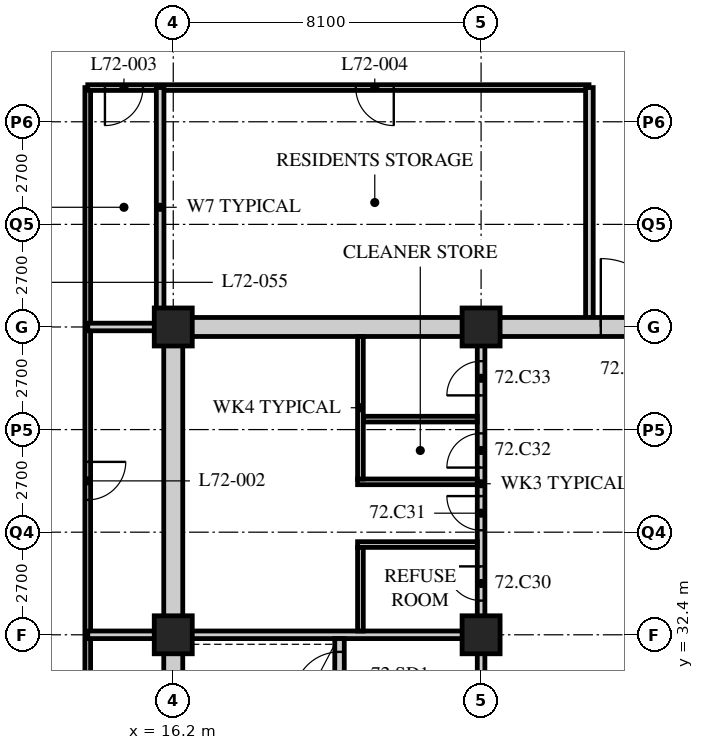
"""IFC4 building model, lengths in metres.
Left out: names, types, materials, properties, quantities, classifications, styles, units other than length and angle.
Written with IfcOpenShell. Run it as: python <this file> out.ifc"""

import sys

from ifc_helpers import new_model, si_unit, direction, frame, frame_2d, origin, origin_2d, place, context, subcontext, project, spatial, rectangle, hollow_rectangle, extrude, element, fill, save


model = new_model("IFC4")
c1 = context("Model", 3, precision=1e-05, world=origin(), true_north=direction((0.0, 1.0)))
c2 = subcontext(c1, "Body", "Model", "MODEL_VIEW")
j1 = project(units=[si_unit("LENGTHUNIT", "METRE"), si_unit("PLANEANGLEUNIT", "RADIAN")], contexts=[c1])
p1 = place(None, origin())
s1 = spatial("IfcSite", under=j1, at=p1, CompositionType="ELEMENT")
p2 = place(p1, origin())
s2 = spatial("IfcBuilding", under=s1, at=p2, CompositionType="ELEMENT")
p3 = place(p2, frame((0.0, 0.0, 281.4)))
s3 = spatial("IfcBuildingStorey", under=s2, at=p3, CompositionType="ELEMENT", Elevation=281.4)
for number, where, z_axis, x_axis in (
    (1, (16.2, 32.4, 0.0), (0.0, 0.0, 1.0), (1.0, 0.0, 0.0)),
    (2, (16.2, 40.5, 0.0), (0.0, 0.0, 1.0), (1.0, 0.0, 0.0)),
    (3, (24.3, 32.4, 0.0), (0.0, 0.0, 1.0), (1.0, 0.0, 0.0)),
    (4, (24.3, 40.5, 0.0), (0.0, 0.0, 1.0), (1.0, 0.0, 0.0)),
):
    element("IfcColumn", number, at=place(p3, frame(where, z_axis=z_axis, x_axis=x_axis)), inside=s3, PredefinedType="COLUMN", context=c2, shape_type="SweptSolid", body=[
        extrude(hollow_rectangle(XDim=1.0, YDim=1.0, WallThickness=0.1, at=origin_2d()), origin(), (0.0, 0.0, 1.0), 3.9),
    ])
p4 = place(p3, frame((13.95, 24.3, 0.0), z_axis=(0.0, 0.0, 1.0), x_axis=(0.0, 1.0, 0.0)))
e5 = element("IfcWall", 5, at=p4, inside=s3, PredefinedType="PARTITIONING", context=c2, shape_type="SweptSolid", body=[
    extrude(rectangle(XDim=22.5, YDim=0.15, at=frame_2d((11.25, 0.0))), origin(), (0.0, 0.0, 1.0), 3.69),
])
p5 = place(p4, frame((3.55, 0.0, 0.0)))
e6 = element("IfcOpeningElement", 6, at=p5, cuts=e5, PredefinedType="OPENING", context=c2, shape_type="SweptSolid", body=[
    extrude(rectangle(XDim=1.0, YDim=2.1, at=frame_2d((0.5, 1.05))), frame((0.0, 0.085, 0.0), z_axis=(0.0, -1.0, 0.0), x_axis=(1.0, 0.0, 0.0)), (0.0, 0.0, 1.0), 0.17),
])
p6 = place(p4, frame((11.65, 0.0, 0.0)))
e7 = element("IfcOpeningElement", 7, at=p6, cuts=e5, PredefinedType="OPENING", context=c2, shape_type="SweptSolid", body=[
    extrude(rectangle(XDim=1.0, YDim=2.1, at=frame_2d((0.5, 1.05))), frame((0.0, 0.085, 0.0), z_axis=(0.0, -1.0, 0.0), x_axis=(1.0, 0.0, 0.0)), (0.0, 0.0, 1.0), 0.17),
])
p7 = place(p3, frame((13.95, 46.8, 0.0), z_axis=(0.0, 0.0, 1.0), x_axis=(1.0, 0.0, 0.0)))
e8 = element("IfcWall", 8, at=p7, inside=s3, PredefinedType="PARTITIONING", context=c2, shape_type="SweptSolid", body=[
    extrude(rectangle(XDim=13.19, YDim=0.15, at=frame_2d((6.595, 0.0))), origin(), (0.0, 0.0, 1.0), 3.69),
])
p8 = place(p7, frame((0.452, 0.0, 0.0)))
e9 = element("IfcOpeningElement", 9, at=p8, cuts=e8, PredefinedType="OPENING", context=c2, shape_type="SweptSolid", body=[
    extrude(rectangle(XDim=1.0, YDim=2.1, at=frame_2d((0.5, 1.05))), frame((0.0, 0.085, 0.0), z_axis=(0.0, -1.0, 0.0), x_axis=(1.0, 0.0, 0.0)), (0.0, 0.0, 1.0), 0.17),
])
p9 = place(p7, frame((7.052, 0.0, 0.0)))
e10 = element("IfcOpeningElement", 10, at=p9, cuts=e8, PredefinedType="OPENING", context=c2, shape_type="SweptSolid", body=[
    extrude(rectangle(XDim=1.0, YDim=2.1, at=frame_2d((0.5, 1.05))), frame((0.0, 0.085, 0.0), z_axis=(0.0, -1.0, 0.0), x_axis=(1.0, 0.0, 0.0)), (0.0, 0.0, 1.0), 0.17),
])
p10 = place(p3, frame((13.95, 32.4, 0.0), z_axis=(0.0, 0.0, 1.0), x_axis=(1.0, 0.0, 0.0)))
e11 = element("IfcWall", 11, at=p10, inside=s3, PredefinedType="SOLIDWALL", context=c2, shape_type="SweptSolid", body=[
    extrude(rectangle(XDim=2.25, YDim=0.2, at=frame_2d((1.125, 0.0))), origin(), (0.0, 0.0, 1.0), 3.078),
])
for number, where, z_axis, x_axis in (
    (12, (15.855, 46.8, 0.0), (0.0, 0.0, 1.0), (0.0, -1.0, 0.0)),
    (13, (27.15, 40.5, 0.0), (0.0, 0.0, 1.0), (0.0, 1.0, 0.0)),
):
    element("IfcWall", number, at=place(p3, frame(where, z_axis=z_axis, x_axis=x_axis)), inside=s3, PredefinedType="SOLIDWALL", context=c2, shape_type="SweptSolid", body=[
        extrude(rectangle(XDim=6.3, YDim=0.2, at=frame_2d((3.15, 0.0))), origin(), (0.0, 0.0, 1.0), 3.69),
    ])
p11 = place(p3, frame((13.95, 40.5, 0.0), z_axis=(0.0, 0.0, 1.0), x_axis=(1.0, 0.0, 0.0)))
e14 = element("IfcWall", 14, at=p11, inside=s3, PredefinedType="SOLIDWALL", context=c2, shape_type="SweptSolid", body=[
    extrude(rectangle(XDim=2.25, YDim=0.2, at=frame_2d((1.125, 0.0))), origin(), (0.0, 0.0, 1.0), 3.078),
])
p12 = place(p3, frame((15.95, 40.5, 0.0), z_axis=(0.0, 0.0, 1.0), x_axis=(1.0, 0.0, 0.0)))
e15 = element("IfcWall", 15, at=p12, inside=s3, PredefinedType="SOLIDWALL", context=c2, shape_type="SweptSolid", body=[
    extrude(rectangle(XDim=24.55, YDim=0.5, at=frame_2d((12.275, 0.0))), origin(), (0.0, 0.0, 1.0), 3.04),
])
p13 = place(p12, frame((11.5, 0.0, 0.0)))
e16 = element("IfcOpeningElement", 16, at=p13, cuts=e15, PredefinedType="OPENING", context=c2, shape_type="SweptSolid", body=[
    extrude(rectangle(XDim=1.8, YDim=2.4, at=frame_2d((0.9, 1.2))), frame((0.0, 0.26, 0.0), z_axis=(0.0, -1.0, 0.0), x_axis=(1.0, 0.0, 0.0)), (0.0, 0.0, 1.0), 0.52),
])
p14 = place(p3, frame((16.2, 24.55, 0.0), z_axis=(0.0, 0.0, 1.0), x_axis=(0.0, 1.0, 0.0)))
e17 = element("IfcWall", 17, at=p14, inside=s3, PredefinedType="SOLIDWALL", context=c2, shape_type="SweptSolid", body=[
    extrude(rectangle(XDim=15.7, YDim=0.5, at=frame_2d((7.85, 0.0))), origin(), (0.0, 0.0, 1.0), 3.078),
])
p15 = place(p3, frame((16.45, 32.4, 0.0), z_axis=(0.0, 0.0, 1.0), x_axis=(1.0, 0.0, 0.0)))
e18 = element("IfcWall", 18, at=p15, inside=s3, PredefinedType="SOLIDWALL", context=c2, shape_type="SweptSolid", body=[
    extrude(rectangle(XDim=7.95, YDim=0.2, at=frame_2d((3.975, 0.0))), origin(), (0.0, 0.0, 1.0), 3.078),
])
p16 = place(p3, frame((24.3, 24.55, 0.0), z_axis=(0.0, 0.0, 1.0), x_axis=(0.0, 1.0, 0.0)))
e19 = element("IfcWall", 19, at=p16, inside=s3, PredefinedType="SOLIDWALL", context=c2, shape_type="SweptSolid", body=[
    extrude(rectangle(XDim=7.75, YDim=0.2, at=frame_2d((3.875, 0.0))), origin(), (0.0, 0.0, 1.0), 3.078),
])
p17 = place(p16, frame((4.6, 0.0, 0.0)))
e20 = element("IfcOpeningElement", 20, at=p17, cuts=e19, PredefinedType="OPENING", context=c2, shape_type="SweptSolid", body=[
    extrude(rectangle(XDim=1.2, YDim=2.1, at=frame_2d((0.6, 1.05))), frame((0.0, 0.11, 0.0), z_axis=(0.0, -1.0, 0.0), x_axis=(1.0, 0.0, 0.0)), (0.0, 0.0, 1.0), 0.22),
])
p18 = place(p3, frame((20.575, 24.55, 0.0), z_axis=(0.0, 0.0, 1.0), x_axis=(0.0, 1.0, 0.0)))
e21 = element("IfcWall", 21, at=p18, inside=s3, PredefinedType="SOLIDWALL", context=c2, shape_type="SweptSolid", body=[
    extrude(rectangle(XDim=7.75, YDim=0.25, at=frame_2d((3.875, 0.0))), origin(), (0.0, 0.0, 1.0), 3.69),
])
p19 = place(p18, frame((6.2, 0.0, 0.0)))
e22 = element("IfcOpeningElement", 22, at=p19, cuts=e21, PredefinedType="OPENING", context=c2, shape_type="SweptSolid", body=[
    extrude(rectangle(XDim=1.2, YDim=2.1, at=frame_2d((0.6, 1.05))), frame((0.0, 0.135, 0.0), z_axis=(0.0, -1.0, 0.0), x_axis=(1.0, 0.0, 0.0)), (0.0, 0.0, 1.0), 0.27),
])
p20 = place(p3, frame((24.3, 32.5, 0.0), z_axis=(0.0, 0.0, 1.0), x_axis=(0.0, 1.0, 0.0)))
e23 = element("IfcWall", 23, at=p20, inside=s3, PredefinedType="PARTITIONING", context=c2, shape_type="SweptSolid", body=[
    extrude(rectangle(XDim=7.75, YDim=0.2, at=frame_2d((3.875, 0.0))), origin(), (0.0, 0.0, 1.0), 3.078),
])
p21 = place(p20, frame((0.8, 0.0, 0.0)))
e24 = element("IfcOpeningElement", 24, at=p21, cuts=e23, PredefinedType="OPENING", context=c2, shape_type="SweptSolid", body=[
    extrude(rectangle(XDim=0.9, YDim=2.1, at=frame_2d((0.45, 1.05))), frame((0.0, 0.11, 0.0), z_axis=(0.0, -1.0, 0.0), x_axis=(1.0, 0.0, 0.0)), (0.0, 0.0, 1.0), 0.22),
])
p22 = place(p20, frame((2.65, 0.0, 0.0)))
e25 = element("IfcOpeningElement", 25, at=p22, cuts=e23, PredefinedType="OPENING", context=c2, shape_type="SweptSolid", body=[
    extrude(rectangle(XDim=0.9, YDim=2.1, at=frame_2d((0.45, 1.05))), frame((0.0, 0.11, 0.0), z_axis=(0.0, -1.0, 0.0), x_axis=(1.0, 0.0, 0.0)), (0.0, 0.0, 1.0), 0.22),
])
p23 = place(p20, frame((4.3, 0.0, 0.0)))
e26 = element("IfcOpeningElement", 26, at=p23, cuts=e23, PredefinedType="OPENING", context=c2, shape_type="SweptSolid", body=[
    extrude(rectangle(XDim=0.9, YDim=2.1, at=frame_2d((0.45, 1.05))), frame((0.0, 0.11, 0.0), z_axis=(0.0, -1.0, 0.0), x_axis=(1.0, 0.0, 0.0)), (0.0, 0.0, 1.0), 0.22),
])
p24 = place(p20, frame((6.2, 0.0, 0.0)))
e27 = element("IfcOpeningElement", 27, at=p24, cuts=e23, PredefinedType="OPENING", context=c2, shape_type="SweptSolid", body=[
    extrude(rectangle(XDim=0.9, YDim=2.1, at=frame_2d((0.45, 1.05))), frame((0.0, 0.11, 0.0), z_axis=(0.0, -1.0, 0.0), x_axis=(1.0, 0.0, 0.0)), (0.0, 0.0, 1.0), 0.22),
])
for number, where, z_axis, x_axis in (
    (28, (21.05, 34.775, 0.0), (0.0, 0.0, 1.0), (1.0, 0.0, 0.0)),
    (29, (21.05, 36.425, 0.0), (0.0, 0.0, 1.0), (1.0, 0.0, 0.0)),
):
    element("IfcWall", number, at=place(p3, frame(where, z_axis=z_axis, x_axis=x_axis)), inside=s3, PredefinedType="PARTITIONING", context=c2, shape_type="SweptSolid", body=[
        extrude(rectangle(XDim=3.15, YDim=0.15, at=frame_2d((1.575, 0.0))), origin(), (0.0, 0.0, 1.0), 3.69),
    ])
p25 = place(p3, frame((21.2, 38.075, 0.0), z_axis=(0.0, 0.0, 1.0), x_axis=(1.0, 0.0, 0.0)))
e30 = element("IfcWall", 30, at=p25, inside=s3, PredefinedType="PARTITIONING", context=c2, shape_type="SweptSolid", body=[
    extrude(rectangle(XDim=3.0, YDim=0.15, at=frame_2d((1.5, 0.0))), origin(), (0.0, 0.0, 1.0), 3.69),
])
p26 = place(p3, frame((21.125, 32.5, 0.0), z_axis=(0.0, 0.0, 1.0), x_axis=(0.0, 1.0, 0.0)))
e31 = element("IfcWall", 31, at=p26, inside=s3, PredefinedType="PARTITIONING", context=c2, shape_type="SweptSolid", body=[
    extrude(rectangle(XDim=2.2, YDim=0.15, at=frame_2d((1.1, 0.0))), origin(), (0.0, 0.0, 1.0), 3.69),
])
p27 = place(p3, frame((21.125, 36.5, 0.0), z_axis=(0.0, 0.0, 1.0), x_axis=(0.0, 1.0, 0.0)))
e32 = element("IfcWall", 32, at=p27, inside=s3, PredefinedType="PARTITIONING", context=c2, shape_type="SweptSolid", body=[
    extrude(rectangle(XDim=3.75, YDim=0.15, at=frame_2d((1.875, 0.0))), origin(), (0.0, 0.0, 1.0), 3.69),
])
p28 = place(p6, origin())
e33 = element("IfcDoor", 33, at=p28, inside=s3, OperationType="SINGLE_SWING_LEFT", PredefinedType="DOOR", context=c2, shape_type="SweptSolid", body=[
    extrude(rectangle(XDim=1.0, YDim=2.1, at=frame_2d((0.5, 1.05))), frame((0.0, 0.025, 0.0), z_axis=(0.0, -1.0, 0.0), x_axis=(1.0, 0.0, 0.0)), (0.0, 0.0, 1.0), 0.05),
])
fill(e7, e33)
p29 = place(p8, origin())
e34 = element("IfcDoor", 34, at=p29, inside=s3, OperationType="SINGLE_SWING_RIGHT", PredefinedType="DOOR", context=c2, shape_type="SweptSolid", body=[
    extrude(rectangle(XDim=1.0, YDim=2.1, at=frame_2d((0.5, 1.05))), frame((0.0, 0.025, 0.0), z_axis=(0.0, -1.0, 0.0), x_axis=(1.0, 0.0, 0.0)), (0.0, 0.0, 1.0), 0.05),
])
fill(e9, e34)
p30 = place(p9, origin())
e35 = element("IfcDoor", 35, at=p30, inside=s3, OperationType="SINGLE_SWING_LEFT", PredefinedType="DOOR", context=c2, shape_type="SweptSolid", body=[
    extrude(rectangle(XDim=1.0, YDim=2.1, at=frame_2d((0.5, 1.05))), frame((0.0, 0.025, 0.0), z_axis=(0.0, -1.0, 0.0), x_axis=(1.0, 0.0, 0.0)), (0.0, 0.0, 1.0), 0.05),
])
fill(e10, e35)
p31 = place(p21, origin())
e36 = element("IfcDoor", 36, at=p31, inside=s3, OperationType="SINGLE_SWING_RIGHT", PredefinedType="DOOR", context=c2, shape_type="SweptSolid", body=[
    extrude(rectangle(XDim=0.9, YDim=2.1, at=frame_2d((0.45, 1.05))), frame((0.0, 0.025, 0.0), z_axis=(0.0, -1.0, 0.0), x_axis=(1.0, 0.0, 0.0)), (0.0, 0.0, 1.0), 0.05),
])
fill(e24, e36)
p32 = place(p22, origin())
e37 = element("IfcDoor", 37, at=p32, inside=s3, OperationType="SINGLE_SWING_RIGHT", PredefinedType="DOOR", context=c2, shape_type="SweptSolid", body=[
    extrude(rectangle(XDim=0.9, YDim=2.1, at=frame_2d((0.45, 1.05))), frame((0.0, 0.025, 0.0), z_axis=(0.0, -1.0, 0.0), x_axis=(1.0, 0.0, 0.0)), (0.0, 0.0, 1.0), 0.05),
])
fill(e25, e37)
p33 = place(p23, origin())
e38 = element("IfcDoor", 38, at=p33, inside=s3, OperationType="SINGLE_SWING_LEFT", PredefinedType="DOOR", context=c2, shape_type="SweptSolid", body=[
    extrude(rectangle(XDim=0.9, YDim=2.1, at=frame_2d((0.45, 1.05))), frame((0.0, 0.025, 0.0), z_axis=(0.0, -1.0, 0.0), x_axis=(1.0, 0.0, 0.0)), (0.0, 0.0, 1.0), 0.05),
])
fill(e26, e38)
p34 = place(p24, origin())
e39 = element("IfcDoor", 39, at=p34, inside=s3, OperationType="SINGLE_SWING_LEFT", PredefinedType="DOOR", context=c2, shape_type="SweptSolid", body=[
    extrude(rectangle(XDim=0.9, YDim=2.1, at=frame_2d((0.45, 1.05))), frame((0.0, 0.025, 0.0), z_axis=(0.0, -1.0, 0.0), x_axis=(1.0, 0.0, 0.0)), (0.0, 0.0, 1.0), 0.05),
])
fill(e27, e39)
p35 = place(p19, origin())
e40 = element("IfcDoor", 40, at=p35, inside=s3, OperationType="SINGLE_SWING_LEFT", PredefinedType="DOOR", context=c2, shape_type="SweptSolid", body=[
    extrude(rectangle(XDim=1.2, YDim=2.1, at=frame_2d((0.6, 1.05))), frame((0.0, 0.025, 0.0), z_axis=(0.0, -1.0, 0.0), x_axis=(1.0, 0.0, 0.0)), (0.0, 0.0, 1.0), 0.05),
])
fill(e22, e40)
p36 = place(p13, origin())
e41 = element("IfcDoor", 41, at=p36, inside=s3, OperationType="DOUBLE_DOOR_SINGLE_SWING", PredefinedType="DOOR", context=c2, shape_type="SweptSolid", body=[
    extrude(rectangle(XDim=1.8, YDim=2.4, at=frame_2d((0.9, 1.2))), frame((0.0, 0.025, 0.0), z_axis=(0.0, -1.0, 0.0), x_axis=(1.0, 0.0, 0.0)), (0.0, 0.0, 1.0), 0.05),
])
fill(e16, e41)
save(model, sys.argv[1])
